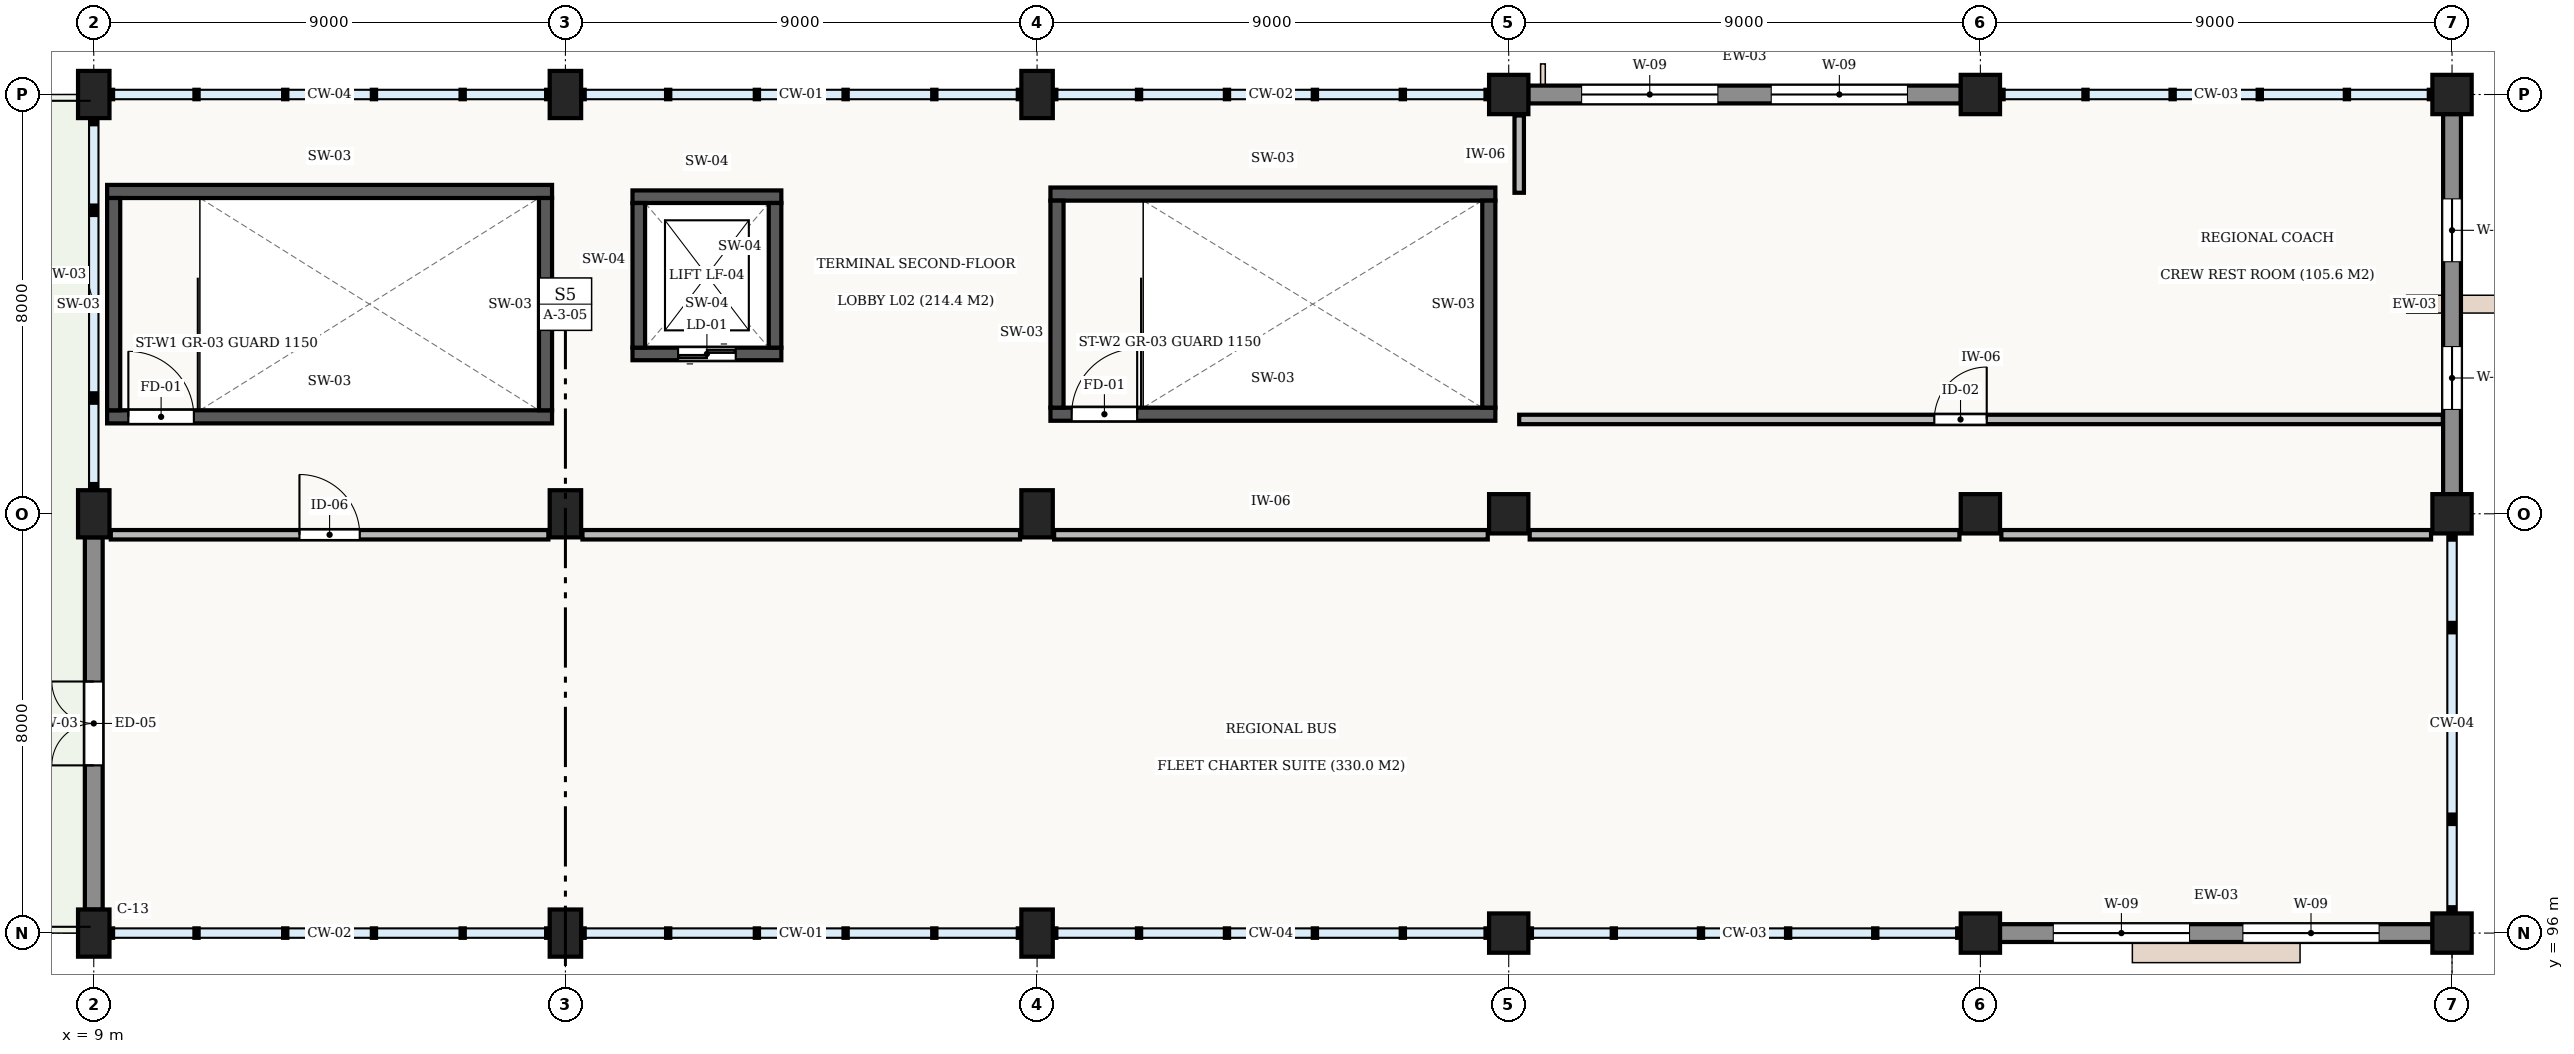
"""IFC4 building model, lengths in metres.
Left out: names, types, materials, properties, quantities, classifications, styles, units other than length and angle.
Written with IfcOpenShell. Run it as: python <this file> out.ifc"""

import sys

from ifc_helpers import new_model, si_unit, direction, frame, frame_2d, origin, origin_2d, place, context, subcontext, project, spatial, rectangle, extrude, element, fill, save


model = new_model("IFC4")
c1 = context("Model", 3, precision=1e-05, world=origin(), true_north=direction((0.0, 1.0)))
c2 = subcontext(c1, "Body", "Model", "MODEL_VIEW")
j1 = project(units=[si_unit("LENGTHUNIT", "METRE"), si_unit("PLANEANGLEUNIT", "RADIAN")], contexts=[c1])
p1 = place(None, origin())
s1 = spatial("IfcSite", under=j1, at=p1, CompositionType="ELEMENT")
p2 = place(p1, origin())
s2 = spatial("IfcBuilding", under=s1, at=p2, CompositionType="ELEMENT")
p3 = place(p2, frame((0.0, 0.0, 10.2)))
s3 = spatial("IfcBuildingStorey", under=s2, at=p3, CompositionType="ELEMENT", Elevation=10.2)
for number, where, z_axis, x_axis in (
    (1, (9.0, 96.0, 0.0), (0.0, 0.0, 1.0), (1.0, 0.0, 0.0)),
    (2, (9.0, 104.0, 0.0), (0.0, 0.0, 1.0), (1.0, 0.0, 0.0)),
    (3, (9.0, 112.0, 0.0), (0.0, 0.0, 1.0), (1.0, 0.0, 0.0)),
    (4, (18.0, 96.0, 0.0), (0.0, 0.0, 1.0), (1.0, 0.0, 0.0)),
    (5, (18.0, 104.0, 0.0), (0.0, 0.0, 1.0), (1.0, 0.0, 0.0)),
    (6, (18.0, 112.0, 0.0), (0.0, 0.0, 1.0), (1.0, 0.0, 0.0)),
    (7, (27.0, 96.0, 0.0), (0.0, 0.0, 1.0), (1.0, 0.0, 0.0)),
    (8, (27.0, 104.0, 0.0), (0.0, 0.0, 1.0), (1.0, 0.0, 0.0)),
    (9, (27.0, 112.0, 0.0), (0.0, 0.0, 1.0), (1.0, 0.0, 0.0)),
):
    element("IfcColumn", number, at=place(p3, frame(where, z_axis=z_axis, x_axis=x_axis)), inside=s3, PredefinedType="COLUMN", context=c2, shape_type="SweptSolid", body=[
        extrude(rectangle(XDim=0.6, YDim=0.9, at=origin_2d()), origin(), (0.0, 0.0, 1.0), 4.2),
    ])
for number, where, z_axis, x_axis in (
    (10, (36.0, 96.0, 0.0), (0.0, 0.0, 1.0), (1.0, 0.0, 0.0)),
    (11, (36.0, 104.0, 0.0), (0.0, 0.0, 1.0), (1.0, 0.0, 0.0)),
    (12, (36.0, 112.0, 0.0), (0.0, 0.0, 1.0), (1.0, 0.0, 0.0)),
    (13, (45.0, 96.0, 0.0), (0.0, 0.0, 1.0), (1.0, 0.0, 0.0)),
    (14, (45.0, 104.0, 0.0), (0.0, 0.0, 1.0), (1.0, 0.0, 0.0)),
    (15, (45.0, 112.0, 0.0), (0.0, 0.0, 1.0), (1.0, 0.0, 0.0)),
    (16, (54.0, 96.0, 0.0), (0.0, 0.0, 1.0), (1.0, 0.0, 0.0)),
    (17, (54.0, 104.0, 0.0), (0.0, 0.0, 1.0), (1.0, 0.0, 0.0)),
    (18, (54.0, 112.0, 0.0), (0.0, 0.0, 1.0), (1.0, 0.0, 0.0)),
):
    element("IfcColumn", number, at=place(p3, frame(where, z_axis=z_axis, x_axis=x_axis)), inside=s3, PredefinedType="COLUMN", context=c2, shape_type="SweptSolid", body=[
        extrude(rectangle(XDim=0.75, YDim=0.75, at=origin_2d()), origin(), (0.0, 0.0, 1.0), 4.2),
    ])
p4 = place(p3, frame((53.627, 96.0, 0.0), z_axis=(0.0, 0.0, 1.0), x_axis=(-1.0, 0.0, 0.0)))
e19 = element("IfcWall", 19, at=p4, inside=s3, PredefinedType="STANDARD", context=c2, shape_type="SweptSolid", body=[
    extrude(rectangle(XDim=8.254, YDim=0.34, at=frame_2d((4.127, 0.0))), origin(), (0.0, 0.0, 1.0), 3.34),
])
p5 = place(p4, frame((1.018, 0.0, 0.9)))
e20 = element("IfcOpeningElement", 20, at=p5, cuts=e19, PredefinedType="OPENING", context=c2, shape_type="SweptSolid", body=[
    extrude(rectangle(XDim=2.6, YDim=1.6, at=frame_2d((1.3, 0.8))), frame((0.0, 0.182, 0.0), z_axis=(0.0, -1.0, 0.0), x_axis=(1.0, 0.0, 0.0)), (0.0, 0.0, 1.0), 0.364),
])
p6 = place(p4, frame((4.636, 0.0, 0.9)))
e21 = element("IfcOpeningElement", 21, at=p6, cuts=e19, PredefinedType="OPENING", context=c2, shape_type="SweptSolid", body=[
    extrude(rectangle(XDim=2.6, YDim=1.6, at=frame_2d((1.3, 0.8))), frame((0.0, 0.182, 0.0), z_axis=(0.0, -1.0, 0.0), x_axis=(1.0, 0.0, 0.0)), (0.0, 0.0, 1.0), 0.364),
])
p7 = place(p3, frame((9.0, 96.448, 0.0), z_axis=(0.0, 0.0, 1.0), x_axis=(0.0, 1.0, 0.0)))
e22 = element("IfcWall", 22, at=p7, inside=s3, PredefinedType="STANDARD", context=c2, shape_type="SweptSolid", body=[
    extrude(rectangle(XDim=7.104, YDim=0.34, at=frame_2d((3.552, 0.0))), origin(), (0.0, 0.0, 1.0), 3.34),
])
p8 = place(p7, frame((2.752, 0.0, 0.0)))
e23 = element("IfcOpeningElement", 23, at=p8, cuts=e22, PredefinedType="OPENING", context=c2, shape_type="SweptSolid", body=[
    extrude(rectangle(XDim=1.6, YDim=2.3, at=frame_2d((0.8, 1.15))), frame((0.0, 0.182, 0.0), z_axis=(0.0, -1.0, 0.0), x_axis=(1.0, 0.0, 0.0)), (0.0, 0.0, 1.0), 0.364),
])
p9 = place(p3, frame((36.373, 112.0, 0.0), z_axis=(0.0, 0.0, 1.0), x_axis=(1.0, 0.0, 0.0)))
e24 = element("IfcWall", 24, at=p9, inside=s3, PredefinedType="STANDARD", context=c2, shape_type="SweptSolid", body=[
    extrude(rectangle(XDim=8.254, YDim=0.34, at=frame_2d((4.127, 0.0))), origin(), (0.0, 0.0, 1.0), 3.34),
])
p10 = place(p9, frame((1.018, 0.0, 0.9)))
e25 = element("IfcOpeningElement", 25, at=p10, cuts=e24, PredefinedType="OPENING", context=c2, shape_type="SweptSolid", body=[
    extrude(rectangle(XDim=2.6, YDim=1.6, at=frame_2d((1.3, 0.8))), frame((0.0, 0.182, 0.0), z_axis=(0.0, -1.0, 0.0), x_axis=(1.0, 0.0, 0.0)), (0.0, 0.0, 1.0), 0.364),
])
p11 = place(p9, frame((4.636, 0.0, 0.9)))
e26 = element("IfcOpeningElement", 26, at=p11, cuts=e24, PredefinedType="OPENING", context=c2, shape_type="SweptSolid", body=[
    extrude(rectangle(XDim=2.6, YDim=1.6, at=frame_2d((1.3, 0.8))), frame((0.0, 0.182, 0.0), z_axis=(0.0, -1.0, 0.0), x_axis=(1.0, 0.0, 0.0)), (0.0, 0.0, 1.0), 0.364),
])
p12 = place(p3, frame((54.0, 111.627, 0.0), z_axis=(0.0, 0.0, 1.0), x_axis=(0.0, -1.0, 0.0)))
e27 = element("IfcWall", 27, at=p12, inside=s3, PredefinedType="STANDARD", context=c2, shape_type="SweptSolid", body=[
    extrude(rectangle(XDim=7.254, YDim=0.34, at=frame_2d((3.627, 0.0))), origin(), (0.0, 0.0, 1.0), 3.34),
])
p13 = place(p12, frame((1.618, 0.0, 0.7)))
e28 = element("IfcOpeningElement", 28, at=p13, cuts=e27, PredefinedType="OPENING", context=c2, shape_type="SweptSolid", body=[
    extrude(rectangle(XDim=1.2, YDim=1.8, at=frame_2d((0.6, 0.9))), frame((0.0, 0.182, 0.0), z_axis=(0.0, -1.0, 0.0), x_axis=(1.0, 0.0, 0.0)), (0.0, 0.0, 1.0), 0.364),
])
p14 = place(p12, frame((4.436, 0.0, 0.7)))
e29 = element("IfcOpeningElement", 29, at=p14, cuts=e27, PredefinedType="OPENING", context=c2, shape_type="SweptSolid", body=[
    extrude(rectangle(XDim=1.2, YDim=1.8, at=frame_2d((0.6, 0.9))), frame((0.0, 0.182, 0.0), z_axis=(0.0, -1.0, 0.0), x_axis=(1.0, 0.0, 0.0)), (0.0, 0.0, 1.0), 0.364),
])
p15 = place(p3, frame((9.255, 105.85, 0.0), z_axis=(0.0, 0.0, 1.0), x_axis=(1.0, 0.0, 0.0)))
e30 = element("IfcWall", 30, at=p15, inside=s3, PredefinedType="SHEAR", context=c2, shape_type="SweptSolid", body=[
    extrude(rectangle(XDim=8.49, YDim=0.25, at=frame_2d((4.245, 0.0))), origin(), (0.0, 0.0, 1.0), 3.89),
])
p16 = place(p15, frame((0.405, 0.0, 0.0)))
e31 = element("IfcOpeningElement", 31, at=p16, cuts=e30, PredefinedType="OPENING", context=c2, shape_type="SweptSolid", body=[
    extrude(rectangle(XDim=1.25, YDim=2.15, at=frame_2d((0.625, 1.075))), frame((0.0, 0.137, 0.0), z_axis=(0.0, -1.0, 0.0), x_axis=(1.0, 0.0, 0.0)), (0.0, 0.0, 1.0), 0.274),
])
p17 = place(p3, frame((17.745, 110.15, 0.0), z_axis=(0.0, 0.0, 1.0), x_axis=(-1.0, 0.0, 0.0)))
e32 = element("IfcWall", 32, at=p17, inside=s3, PredefinedType="SHEAR", context=c2, shape_type="SweptSolid", body=[
    extrude(rectangle(XDim=8.49, YDim=0.25, at=frame_2d((4.245, 0.0))), origin(), (0.0, 0.0, 1.0), 3.89),
])
for number, where, z_axis, x_axis in (
    (33, (9.38, 110.025, 0.0), (0.0, 0.0, 1.0), (0.0, -1.0, 0.0)),
    (34, (17.62, 105.975, 0.0), (0.0, 0.0, 1.0), (0.0, 1.0, 0.0)),
):
    element("IfcWall", number, at=place(p3, frame(where, z_axis=z_axis, x_axis=x_axis)), inside=s3, PredefinedType="SHEAR", context=c2, shape_type="SweptSolid", body=[
        extrude(rectangle(XDim=4.05, YDim=0.25, at=frame_2d((2.025, 0.0))), origin(), (0.0, 0.0, 1.0), 3.89),
    ])
p18 = place(p3, frame((27.255, 105.9, 0.0), z_axis=(0.0, 0.0, 1.0), x_axis=(1.0, 0.0, 0.0)))
e35 = element("IfcWall", 35, at=p18, inside=s3, PredefinedType="SHEAR", context=c2, shape_type="SweptSolid", body=[
    extrude(rectangle(XDim=8.49, YDim=0.25, at=frame_2d((4.245, 0.0))), origin(), (0.0, 0.0, 1.0), 3.89),
])
p19 = place(p18, frame((0.405, 0.0, 0.0)))
e36 = element("IfcOpeningElement", 36, at=p19, cuts=e35, PredefinedType="OPENING", context=c2, shape_type="SweptSolid", body=[
    extrude(rectangle(XDim=1.25, YDim=2.15, at=frame_2d((0.625, 1.075))), frame((0.0, 0.137, 0.0), z_axis=(0.0, -1.0, 0.0), x_axis=(1.0, 0.0, 0.0)), (0.0, 0.0, 1.0), 0.274),
])
p20 = place(p3, frame((35.745, 110.1, 0.0), z_axis=(0.0, 0.0, 1.0), x_axis=(-1.0, 0.0, 0.0)))
e37 = element("IfcWall", 37, at=p20, inside=s3, PredefinedType="SHEAR", context=c2, shape_type="SweptSolid", body=[
    extrude(rectangle(XDim=8.49, YDim=0.25, at=frame_2d((4.245, 0.0))), origin(), (0.0, 0.0, 1.0), 3.89),
])
for number, where, z_axis, x_axis in (
    (38, (27.38, 109.975, 0.0), (0.0, 0.0, 1.0), (0.0, -1.0, 0.0)),
    (39, (35.62, 106.025, 0.0), (0.0, 0.0, 1.0), (0.0, 1.0, 0.0)),
):
    element("IfcWall", number, at=place(p3, frame(where, z_axis=z_axis, x_axis=x_axis)), inside=s3, PredefinedType="SHEAR", context=c2, shape_type="SweptSolid", body=[
        extrude(rectangle(XDim=3.95, YDim=0.25, at=frame_2d((1.975, 0.0))), origin(), (0.0, 0.0, 1.0), 3.89),
    ])
p21 = place(p3, frame((19.28, 107.05, 0.0), z_axis=(0.0, 0.0, 1.0), x_axis=(1.0, 0.0, 0.0)))
e40 = element("IfcWall", 40, at=p21, inside=s3, PredefinedType="SHEAR", context=c2, shape_type="SweptSolid", body=[
    extrude(rectangle(XDim=2.84, YDim=0.24, at=frame_2d((1.42, 0.0))), origin(), (0.0, 0.0, 1.0), 3.89),
])
p22 = place(p21, frame((0.87, 0.0, 0.0)))
e41 = element("IfcOpeningElement", 41, at=p22, cuts=e40, PredefinedType="OPENING", context=c2, shape_type="SweptSolid", body=[
    extrude(rectangle(XDim=1.1, YDim=2.2, at=frame_2d((0.55, 1.1))), frame((0.0, 0.132, 0.0), z_axis=(0.0, -1.0, 0.0), x_axis=(1.0, 0.0, 0.0)), (0.0, 0.0, 1.0), 0.264),
])
p23 = place(p3, frame((22.12, 110.05, 0.0), z_axis=(0.0, 0.0, 1.0), x_axis=(-1.0, 0.0, 0.0)))
e42 = element("IfcWall", 42, at=p23, inside=s3, PredefinedType="SHEAR", context=c2, shape_type="SweptSolid", body=[
    extrude(rectangle(XDim=2.84, YDim=0.24, at=frame_2d((1.42, 0.0))), origin(), (0.0, 0.0, 1.0), 3.89),
])
for number, where, z_axis, x_axis in (
    (43, (19.4, 109.93, 0.0), (0.0, 0.0, 1.0), (0.0, -1.0, 0.0)),
    (44, (22.0, 107.17, 0.0), (0.0, 0.0, 1.0), (0.0, 1.0, 0.0)),
):
    element("IfcWall", number, at=place(p3, frame(where, z_axis=z_axis, x_axis=x_axis)), inside=s3, PredefinedType="SHEAR", context=c2, shape_type="SweptSolid", body=[
        extrude(rectangle(XDim=2.76, YDim=0.24, at=frame_2d((1.38, 0.0))), origin(), (0.0, 0.0, 1.0), 3.89),
    ])
p24 = place(p3, frame((9.325, 103.6, 0.0), z_axis=(0.0, 0.0, 1.0), x_axis=(1.0, 0.0, 0.0)))
e45 = element("IfcWall", 45, at=p24, inside=s3, PredefinedType="STANDARD", context=c2, shape_type="SweptSolid", body=[
    extrude(rectangle(XDim=8.35, YDim=0.18, at=frame_2d((4.175, 0.0))), origin(), (0.0, 0.0, 1.0), 3.89),
])
p25 = place(p24, frame((3.6, 0.0, 0.0)))
e46 = element("IfcOpeningElement", 46, at=p25, cuts=e45, PredefinedType="OPENING", context=c2, shape_type="SweptSolid", body=[
    extrude(rectangle(XDim=1.15, YDim=2.15, at=frame_2d((0.575, 1.075))), frame((0.0, 0.102, 0.0), z_axis=(0.0, -1.0, 0.0), x_axis=(1.0, 0.0, 0.0)), (0.0, 0.0, 1.0), 0.204),
])
p26 = place(p3, frame((18.325, 103.6, 0.0), z_axis=(0.0, 0.0, 1.0), x_axis=(1.0, 0.0, 0.0)))
e47 = element("IfcWall", 47, at=p26, inside=s3, PredefinedType="STANDARD", context=c2, shape_type="SweptSolid", body=[
    extrude(rectangle(XDim=8.35, YDim=0.18, at=frame_2d((4.175, 0.0))), origin(), (0.0, 0.0, 1.0), 3.89),
])
p27 = place(p3, frame((27.325, 103.6, 0.0), z_axis=(0.0, 0.0, 1.0), x_axis=(1.0, 0.0, 0.0)))
e48 = element("IfcWall", 48, at=p27, inside=s3, PredefinedType="STANDARD", context=c2, shape_type="SweptSolid", body=[
    extrude(rectangle(XDim=8.275, YDim=0.18, at=frame_2d((4.138, 0.0))), origin(), (0.0, 0.0, 1.0), 3.89),
])
for number, where, z_axis, x_axis in (
    (49, (36.4, 103.6, 0.0), (0.0, 0.0, 1.0), (1.0, 0.0, 0.0)),
    (50, (45.4, 103.6, 0.0), (0.0, 0.0, 1.0), (1.0, 0.0, 0.0)),
):
    element("IfcWall", number, at=place(p3, frame(where, z_axis=z_axis, x_axis=x_axis)), inside=s3, PredefinedType="STANDARD", context=c2, shape_type="SweptSolid", body=[
        extrude(rectangle(XDim=8.2, YDim=0.18, at=frame_2d((4.1, 0.0))), origin(), (0.0, 0.0, 1.0), 3.89),
    ])
p28 = place(p3, frame((36.2, 105.8, 0.0), z_axis=(0.0, 0.0, 1.0), x_axis=(1.0, 0.0, 0.0)))
e51 = element("IfcWall", 51, at=p28, inside=s3, PredefinedType="STANDARD", context=c2, shape_type="SweptSolid", body=[
    extrude(rectangle(XDim=17.625, YDim=0.18, at=frame_2d((8.812, 0.0))), origin(), (0.0, 0.0, 1.0), 3.89),
])
p29 = place(p28, frame((7.921, 0.0, 0.0)))
e52 = element("IfcOpeningElement", 52, at=p29, cuts=e51, PredefinedType="OPENING", context=c2, shape_type="SweptSolid", body=[
    extrude(rectangle(XDim=1.0, YDim=2.1, at=frame_2d((0.5, 1.05))), frame((0.0, 0.102, 0.0), z_axis=(0.0, -1.0, 0.0), x_axis=(1.0, 0.0, 0.0)), (0.0, 0.0, 1.0), 0.204),
])
p30 = place(p3, frame((36.2, 110.125, 0.0), z_axis=(0.0, 0.0, 1.0), x_axis=(0.0, 1.0, 0.0)))
e53 = element("IfcWall", 53, at=p30, inside=s3, PredefinedType="STANDARD", context=c2, shape_type="SweptSolid", body=[
    extrude(rectangle(XDim=1.475, YDim=0.18, at=frame_2d((0.738, 0.0))), origin(), (0.0, 0.0, 1.0), 3.34),
])
p31 = place(p5, origin())
e54 = element("IfcWindow", 54, at=p31, inside=s3, PartitioningType="SINGLE_PANEL", PredefinedType="WINDOW", context=c2, shape_type="SweptSolid", body=[
    extrude(rectangle(XDim=2.6, YDim=1.6, at=frame_2d((1.3, 0.8))), frame((0.0, 0.03, 0.0), z_axis=(0.0, -1.0, 0.0), x_axis=(1.0, 0.0, 0.0)), (0.0, 0.0, 1.0), 0.06),
])
fill(e20, e54)
p32 = place(p6, origin())
e55 = element("IfcWindow", 55, at=p32, inside=s3, PartitioningType="SINGLE_PANEL", PredefinedType="WINDOW", context=c2, shape_type="SweptSolid", body=[
    extrude(rectangle(XDim=2.6, YDim=1.6, at=frame_2d((1.3, 0.8))), frame((0.0, 0.03, 0.0), z_axis=(0.0, -1.0, 0.0), x_axis=(1.0, 0.0, 0.0)), (0.0, 0.0, 1.0), 0.06),
])
fill(e21, e55)
p33 = place(p8, origin())
e56 = element("IfcDoor", 56, at=p33, inside=s3, OperationType="SINGLE_SWING_LEFT", PredefinedType="DOOR", context=c2, shape_type="SweptSolid", body=[
    extrude(rectangle(XDim=1.6, YDim=2.3, at=frame_2d((0.8, 1.15))), frame((0.0, 0.025, 0.0), z_axis=(0.0, -1.0, 0.0), x_axis=(1.0, 0.0, 0.0)), (0.0, 0.0, 1.0), 0.05),
])
fill(e23, e56)
p34 = place(p10, origin())
e57 = element("IfcWindow", 57, at=p34, inside=s3, PartitioningType="SINGLE_PANEL", PredefinedType="WINDOW", context=c2, shape_type="SweptSolid", body=[
    extrude(rectangle(XDim=2.6, YDim=1.6, at=frame_2d((1.3, 0.8))), frame((0.0, 0.03, 0.0), z_axis=(0.0, -1.0, 0.0), x_axis=(1.0, 0.0, 0.0)), (0.0, 0.0, 1.0), 0.06),
])
fill(e25, e57)
p35 = place(p11, origin())
e58 = element("IfcWindow", 58, at=p35, inside=s3, PartitioningType="SINGLE_PANEL", PredefinedType="WINDOW", context=c2, shape_type="SweptSolid", body=[
    extrude(rectangle(XDim=2.6, YDim=1.6, at=frame_2d((1.3, 0.8))), frame((0.0, 0.03, 0.0), z_axis=(0.0, -1.0, 0.0), x_axis=(1.0, 0.0, 0.0)), (0.0, 0.0, 1.0), 0.06),
])
fill(e26, e58)
p36 = place(p13, origin())
e59 = element("IfcWindow", 59, at=p36, inside=s3, PartitioningType="SINGLE_PANEL", PredefinedType="WINDOW", context=c2, shape_type="SweptSolid", body=[
    extrude(rectangle(XDim=1.2, YDim=1.8, at=frame_2d((0.6, 0.9))), frame((0.0, 0.03, 0.0), z_axis=(0.0, -1.0, 0.0), x_axis=(1.0, 0.0, 0.0)), (0.0, 0.0, 1.0), 0.06),
])
fill(e28, e59)
p37 = place(p14, origin())
e60 = element("IfcWindow", 60, at=p37, inside=s3, PartitioningType="SINGLE_PANEL", PredefinedType="WINDOW", context=c2, shape_type="SweptSolid", body=[
    extrude(rectangle(XDim=1.2, YDim=1.8, at=frame_2d((0.6, 0.9))), frame((0.0, 0.03, 0.0), z_axis=(0.0, -1.0, 0.0), x_axis=(1.0, 0.0, 0.0)), (0.0, 0.0, 1.0), 0.06),
])
fill(e29, e60)
p38 = place(p16, origin())
e61 = element("IfcDoor", 61, at=p38, inside=s3, OperationType="SINGLE_SWING_LEFT", PredefinedType="DOOR", context=c2, shape_type="SweptSolid", body=[
    extrude(rectangle(XDim=1.25, YDim=2.15, at=frame_2d((0.625, 1.075))), frame((0.0, 0.025, 0.0), z_axis=(0.0, -1.0, 0.0), x_axis=(1.0, 0.0, 0.0)), (0.0, 0.0, 1.0), 0.05),
])
fill(e31, e61)
p39 = place(p19, origin())
e62 = element("IfcDoor", 62, at=p39, inside=s3, OperationType="SINGLE_SWING_RIGHT", PredefinedType="DOOR", context=c2, shape_type="SweptSolid", body=[
    extrude(rectangle(XDim=1.25, YDim=2.15, at=frame_2d((0.625, 1.075))), frame((0.0, 0.025, 0.0), z_axis=(0.0, -1.0, 0.0), x_axis=(1.0, 0.0, 0.0)), (0.0, 0.0, 1.0), 0.05),
])
fill(e36, e62)
p40 = place(p22, origin())
e63 = element("IfcDoor", 63, at=p40, inside=s3, OperationType="DOUBLE_DOOR_SLIDING", PredefinedType="DOOR", context=c2, shape_type="SweptSolid", body=[
    extrude(rectangle(XDim=1.1, YDim=2.2, at=frame_2d((0.55, 1.1))), frame((0.0, 0.025, 0.0), z_axis=(0.0, -1.0, 0.0), x_axis=(1.0, 0.0, 0.0)), (0.0, 0.0, 1.0), 0.05),
])
fill(e41, e63)
p41 = place(p25, origin())
e64 = element("IfcDoor", 64, at=p41, inside=s3, OperationType="SINGLE_SWING_LEFT", PredefinedType="DOOR", context=c2, shape_type="SweptSolid", body=[
    extrude(rectangle(XDim=1.15, YDim=2.15, at=frame_2d((0.575, 1.075))), frame((0.0, 0.025, 0.0), z_axis=(0.0, -1.0, 0.0), x_axis=(1.0, 0.0, 0.0)), (0.0, 0.0, 1.0), 0.05),
])
fill(e46, e64)
p42 = place(p29, origin())
e65 = element("IfcDoor", 65, at=p42, inside=s3, OperationType="SINGLE_SWING_RIGHT", PredefinedType="DOOR", context=c2, shape_type="SweptSolid", body=[
    extrude(rectangle(XDim=1.0, YDim=2.1, at=frame_2d((0.5, 1.05))), frame((0.0, 0.025, 0.0), z_axis=(0.0, -1.0, 0.0), x_axis=(1.0, 0.0, 0.0)), (0.0, 0.0, 1.0), 0.05),
])
fill(e52, e65)
save(model, sys.argv[1])
